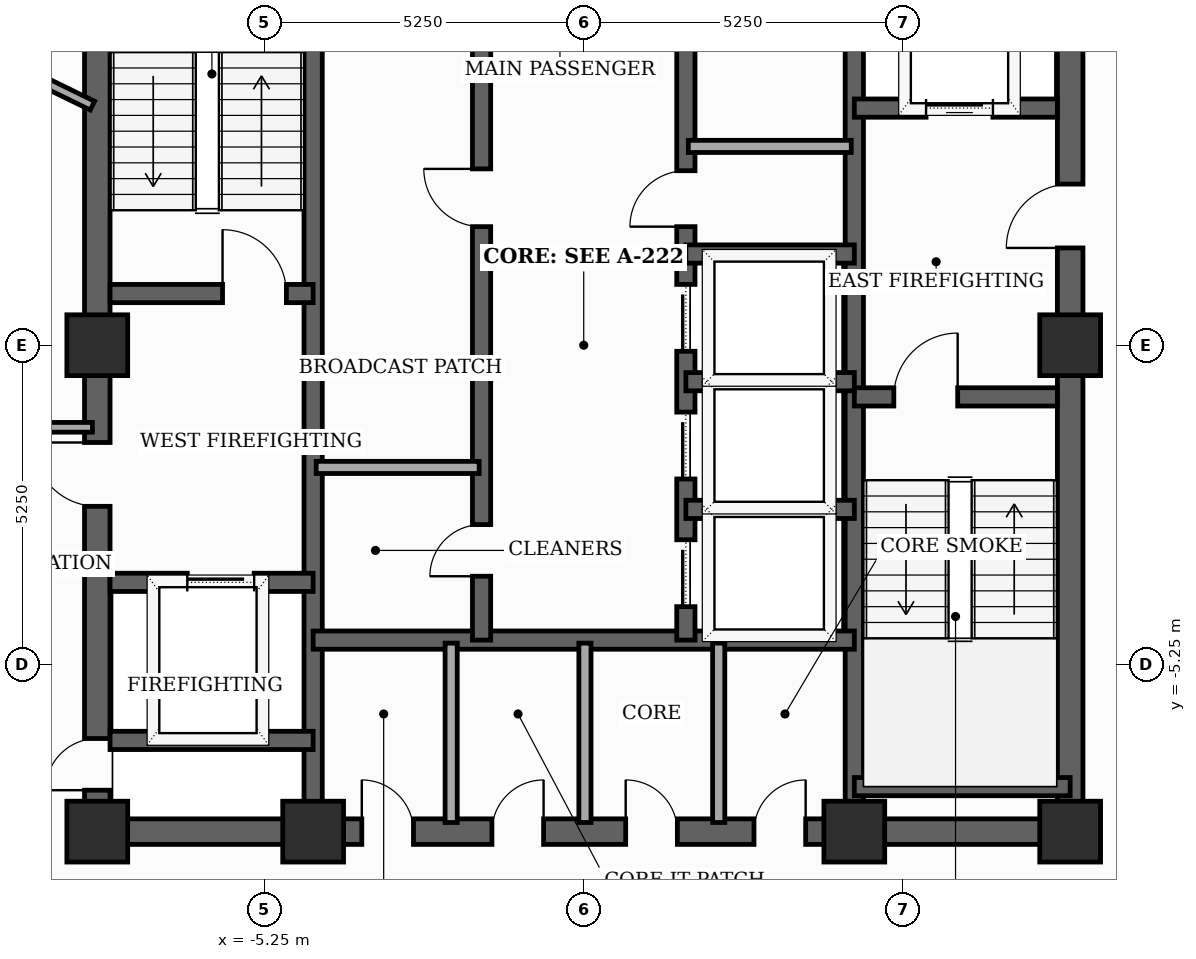
"""IFC4 building model, lengths in metres.
Left out: names, types, materials, properties, quantities, classifications, styles, units other than length and angle.
Written with IfcOpenShell. Run it as: python <this file> out.ifc"""

import sys

from ifc_helpers import new_model, si_unit, direction, frame, frame_2d, origin, origin_2d, place, context, subcontext, project, spatial, rectangle, extrude, element, fill, save


model = new_model("IFC4")
c1 = context("Model", 3, precision=1e-05, world=origin(), true_north=direction((0.0, 1.0)))
c2 = subcontext(c1, "Body", "Model", "MODEL_VIEW")
j1 = project(units=[si_unit("LENGTHUNIT", "METRE"), si_unit("PLANEANGLEUNIT", "RADIAN")], contexts=[c1])
p1 = place(None, origin())
s1 = spatial("IfcSite", under=j1, at=p1, CompositionType="ELEMENT")
p2 = place(p1, origin())
s2 = spatial("IfcBuilding", under=s1, at=p2, CompositionType="ELEMENT")
p3 = place(p2, frame((0.0, 0.0, 305.4)))
s3 = spatial("IfcBuildingStorey", under=s2, at=p3, CompositionType="ELEMENT", Elevation=305.4)
for number, where, z_axis, x_axis in (
    (1, (-8.0, -8.0, 0.0), (0.0, 0.0, 1.0), (1.0, 0.0, 0.0)),
    (2, (-4.45, -8.0, 0.0), (0.0, 0.0, 1.0), (1.0, 0.0, 0.0)),
    (3, (4.45, -8.0, 0.0), (0.0, 0.0, 1.0), (1.0, 0.0, 0.0)),
    (4, (8.0, -8.0, 0.0), (0.0, 0.0, 1.0), (1.0, 0.0, 0.0)),
    (5, (8.0, 0.0, 0.0), (0.0, 0.0, 1.0), (1.0, 0.0, 0.0)),
    (6, (-8.0, 0.0, 0.0), (0.0, 0.0, 1.0), (1.0, 0.0, 0.0)),
):
    element("IfcColumn", number, at=place(p3, frame(where, z_axis=z_axis, x_axis=x_axis)), inside=s3, PredefinedType="COLUMN", context=c2, shape_type="SweptSolid", body=[
        extrude(rectangle(XDim=1.0, YDim=1.0, at=origin_2d()), origin(), (0.0, 0.0, 1.0), 3.7),
    ])
p4 = place(p3, frame((-8.0, -8.0, 0.0), z_axis=(0.0, 0.0, 1.0), x_axis=(0.0, 1.0, 0.0)))
e7 = element("IfcWall", 7, at=p4, inside=s3, PredefinedType="SHEAR", context=c2, shape_type="SweptSolid", body=[
    extrude(rectangle(XDim=16.0, YDim=0.42, at=frame_2d((8.0, 0.0))), origin(), (0.0, 0.0, 1.0), 3.5),
])
p5 = place(p4, frame((0.681, 0.0, 0.0)))
e8 = element("IfcOpeningElement", 8, at=p5, cuts=e7, PredefinedType="OPENING", context=c2, shape_type="SweptSolid", body=[
    extrude(rectangle(XDim=0.85, YDim=2.02, at=frame_2d((0.425, 1.01))), frame((0.0, 0.22, 0.0), z_axis=(0.0, -1.0, 0.0), x_axis=(1.0, 0.0, 0.0)), (0.0, 0.0, 1.0), 0.44),
])
p6 = place(p4, frame((5.35, 0.0, 0.0)))
e9 = element("IfcOpeningElement", 9, at=p6, cuts=e7, PredefinedType="OPENING", context=c2, shape_type="SweptSolid", body=[
    extrude(rectangle(XDim=1.05, YDim=2.15, at=frame_2d((0.525, 1.075))), frame((0.0, 0.22, 0.0), z_axis=(0.0, -1.0, 0.0), x_axis=(1.0, 0.0, 0.0)), (0.0, 0.0, 1.0), 0.44),
])
p7 = place(p3, frame((8.0, -8.0, 0.0), z_axis=(0.0, 0.0, 1.0), x_axis=(0.0, 1.0, 0.0)))
e10 = element("IfcWall", 10, at=p7, inside=s3, PredefinedType="SHEAR", context=c2, shape_type="SweptSolid", body=[
    extrude(rectangle(XDim=16.0, YDim=0.42, at=frame_2d((8.0, 0.0))), origin(), (0.0, 0.0, 1.0), 3.5),
])
p8 = place(p7, frame((9.6, 0.0, 0.0)))
e11 = element("IfcOpeningElement", 11, at=p8, cuts=e10, PredefinedType="OPENING", context=c2, shape_type="SweptSolid", body=[
    extrude(rectangle(XDim=1.05, YDim=2.15, at=frame_2d((0.525, 1.075))), frame((0.0, 0.22, 0.0), z_axis=(0.0, -1.0, 0.0), x_axis=(1.0, 0.0, 0.0)), (0.0, 0.0, 1.0), 0.44),
])
p9 = place(p7, frame((14.469, 0.0, 0.0)))
e12 = element("IfcOpeningElement", 12, at=p9, cuts=e10, PredefinedType="OPENING", context=c2, shape_type="SweptSolid", body=[
    extrude(rectangle(XDim=0.85, YDim=2.02, at=frame_2d((0.425, 1.01))), frame((0.0, 0.22, 0.0), z_axis=(0.0, -1.0, 0.0), x_axis=(1.0, 0.0, 0.0)), (0.0, 0.0, 1.0), 0.44),
])
p10 = place(p3, frame((-8.0, -8.0, 0.0), z_axis=(0.0, 0.0, 1.0), x_axis=(1.0, 0.0, 0.0)))
e13 = element("IfcWall", 13, at=p10, inside=s3, PredefinedType="SHEAR", context=c2, shape_type="SweptSolid", body=[
    extrude(rectangle(XDim=16.0, YDim=0.42, at=frame_2d((8.0, 0.0))), origin(), (0.0, 0.0, 1.0), 3.5),
])
p11 = place(p10, frame((4.35, 0.0, 0.0)))
e14 = element("IfcOpeningElement", 14, at=p11, cuts=e13, PredefinedType="OPENING", context=c2, shape_type="SweptSolid", body=[
    extrude(rectangle(XDim=0.85, YDim=2.02, at=frame_2d((0.425, 1.01))), frame((0.0, 0.22, 0.0), z_axis=(0.0, -1.0, 0.0), x_axis=(1.0, 0.0, 0.0)), (0.0, 0.0, 1.0), 0.44),
])
p12 = place(p10, frame((6.49, 0.0, 0.0)))
e15 = element("IfcOpeningElement", 15, at=p12, cuts=e13, PredefinedType="OPENING", context=c2, shape_type="SweptSolid", body=[
    extrude(rectangle(XDim=0.85, YDim=2.02, at=frame_2d((0.425, 1.01))), frame((0.0, 0.22, 0.0), z_axis=(0.0, -1.0, 0.0), x_axis=(1.0, 0.0, 0.0)), (0.0, 0.0, 1.0), 0.44),
])
p13 = place(p10, frame((8.69, 0.0, 0.0)))
e16 = element("IfcOpeningElement", 16, at=p13, cuts=e13, PredefinedType="OPENING", context=c2, shape_type="SweptSolid", body=[
    extrude(rectangle(XDim=0.85, YDim=2.02, at=frame_2d((0.425, 1.01))), frame((0.0, 0.22, 0.0), z_axis=(0.0, -1.0, 0.0), x_axis=(1.0, 0.0, 0.0)), (0.0, 0.0, 1.0), 0.44),
])
p14 = place(p10, frame((10.8, 0.0, 0.0)))
e17 = element("IfcOpeningElement", 17, at=p14, cuts=e13, PredefinedType="OPENING", context=c2, shape_type="SweptSolid", body=[
    extrude(rectangle(XDim=0.85, YDim=2.02, at=frame_2d((0.425, 1.01))), frame((0.0, 0.22, 0.0), z_axis=(0.0, -1.0, 0.0), x_axis=(1.0, 0.0, 0.0)), (0.0, 0.0, 1.0), 0.44),
])
for number, where, z_axis, x_axis in (
    (18, (-4.45, -7.79, 0.0), (0.0, 0.0, 1.0), (0.0, 1.0, 0.0)),
    (19, (4.45, -7.79, 0.0), (0.0, 0.0, 1.0), (0.0, 1.0, 0.0)),
):
    element("IfcWall", number, at=place(p3, frame(where, z_axis=z_axis, x_axis=x_axis)), inside=s3, PredefinedType="SHEAR", context=c2, shape_type="SweptSolid", body=[
        extrude(rectangle(XDim=15.58, YDim=0.3, at=frame_2d((7.79, 0.0))), origin(), (0.0, 0.0, 1.0), 3.5),
    ])
p15 = place(p3, frame((-7.79, 0.85, 0.0), z_axis=(0.0, 0.0, 1.0), x_axis=(1.0, 0.0, 0.0)))
e20 = element("IfcWall", 20, at=p15, inside=s3, PredefinedType="SHEAR", context=c2, shape_type="SweptSolid", body=[
    extrude(rectangle(XDim=3.34, YDim=0.3, at=frame_2d((1.67, 0.0))), origin(), (0.0, 0.0, 1.0), 3.5),
])
p16 = place(p15, frame((1.85, 0.0, 0.0)))
e21 = element("IfcOpeningElement", 21, at=p16, cuts=e20, PredefinedType="OPENING", context=c2, shape_type="SweptSolid", body=[
    extrude(rectangle(XDim=1.05, YDim=2.15, at=frame_2d((0.525, 1.075))), frame((0.0, 0.16, 0.0), z_axis=(0.0, -1.0, 0.0), x_axis=(1.0, 0.0, 0.0)), (0.0, 0.0, 1.0), 0.32),
])
p17 = place(p3, frame((4.45, -0.85, 0.0), z_axis=(0.0, 0.0, 1.0), x_axis=(1.0, 0.0, 0.0)))
e22 = element("IfcWall", 22, at=p17, inside=s3, PredefinedType="SHEAR", context=c2, shape_type="SweptSolid", body=[
    extrude(rectangle(XDim=3.34, YDim=0.3, at=frame_2d((1.67, 0.0))), origin(), (0.0, 0.0, 1.0), 3.5),
])
p18 = place(p17, frame((0.65, 0.0, 0.0)))
e23 = element("IfcOpeningElement", 23, at=p18, cuts=e22, PredefinedType="OPENING", context=c2, shape_type="SweptSolid", body=[
    extrude(rectangle(XDim=1.05, YDim=2.15, at=frame_2d((0.525, 1.075))), frame((0.0, 0.16, 0.0), z_axis=(0.0, -1.0, 0.0), x_axis=(1.0, 0.0, 0.0)), (0.0, 0.0, 1.0), 0.32),
])
p19 = place(p3, frame((4.45, -7.26, 0.0), z_axis=(0.0, 0.0, 1.0), x_axis=(1.0, 0.0, 0.0)))
e24 = element("IfcWall", 24, at=p19, inside=s3, PredefinedType="SHEAR", context=c2, shape_type="SweptSolid", body=[
    extrude(rectangle(XDim=3.55, YDim=0.3, at=frame_2d((1.775, 0.0))), origin(), (0.0, 0.0, 1.0), 3.5),
])
p20 = place(p3, frame((-7.79, -3.9, 0.0), z_axis=(0.0, 0.0, 1.0), x_axis=(1.0, 0.0, 0.0)))
e25 = element("IfcWall", 25, at=p20, inside=s3, PredefinedType="SHEAR", context=c2, shape_type="SweptSolid", body=[
    extrude(rectangle(XDim=3.34, YDim=0.3, at=frame_2d((1.67, 0.0))), origin(), (0.0, 0.0, 1.0), 3.5),
])
p21 = place(p20, frame((1.27, 0.0, 0.0)))
e26 = element("IfcOpeningElement", 26, at=p21, cuts=e25, PredefinedType="OPENING", context=c2, shape_type="SweptSolid", body=[
    extrude(rectangle(XDim=1.1, YDim=2.1, at=frame_2d((0.55, 1.05))), frame((0.0, 0.16, 0.0), z_axis=(0.0, -1.0, 0.0), x_axis=(1.0, 0.0, 0.0)), (0.0, 0.0, 1.0), 0.32),
])
p22 = place(p3, frame((-7.79, -6.5, 0.0), z_axis=(0.0, 0.0, 1.0), x_axis=(1.0, 0.0, 0.0)))
e27 = element("IfcWall", 27, at=p22, inside=s3, PredefinedType="SHEAR", context=c2, shape_type="SweptSolid", body=[
    extrude(rectangle(XDim=3.34, YDim=0.3, at=frame_2d((1.67, 0.0))), origin(), (0.0, 0.0, 1.0), 3.5),
])
p23 = place(p3, frame((4.45, 3.9, 0.0), z_axis=(0.0, 0.0, 1.0), x_axis=(1.0, 0.0, 0.0)))
e28 = element("IfcWall", 28, at=p23, inside=s3, PredefinedType="SHEAR", context=c2, shape_type="SweptSolid", body=[
    extrude(rectangle(XDim=3.34, YDim=0.3, at=frame_2d((1.67, 0.0))), origin(), (0.0, 0.0, 1.0), 3.5),
])
p24 = place(p23, frame((1.18, 0.0, 0.0)))
e29 = element("IfcOpeningElement", 29, at=p24, cuts=e28, PredefinedType="OPENING", context=c2, shape_type="SweptSolid", body=[
    extrude(rectangle(XDim=1.1, YDim=2.1, at=frame_2d((0.55, 1.05))), frame((0.0, 0.16, 0.0), z_axis=(0.0, -1.0, 0.0), x_axis=(1.0, 0.0, 0.0)), (0.0, 0.0, 1.0), 0.32),
])
p25 = place(p3, frame((-4.45, -4.85, 0.0), z_axis=(0.0, 0.0, 1.0), x_axis=(1.0, 0.0, 0.0)))
e30 = element("IfcWall", 30, at=p25, inside=s3, PredefinedType="SHEAR", context=c2, shape_type="SweptSolid", body=[
    extrude(rectangle(XDim=8.9, YDim=0.3, at=frame_2d((4.45, 0.0))), origin(), (0.0, 0.0, 1.0), 3.5),
])
p26 = place(p3, frame((-1.68, -4.85, 0.0), z_axis=(0.0, 0.0, 1.0), x_axis=(0.0, 1.0, 0.0)))
e31 = element("IfcWall", 31, at=p26, inside=s3, PredefinedType="SHEAR", context=c2, shape_type="SweptSolid", body=[
    extrude(rectangle(XDim=12.64, YDim=0.3, at=frame_2d((6.32, 0.0))), origin(), (0.0, 0.0, 1.0), 3.5),
])
p27 = place(p26, frame((1.05, 0.0, 0.0)))
e32 = element("IfcOpeningElement", 32, at=p27, cuts=e31, PredefinedType="OPENING", context=c2, shape_type="SweptSolid", body=[
    extrude(rectangle(XDim=0.85, YDim=2.02, at=frame_2d((0.425, 1.01))), frame((0.0, 0.16, 0.0), z_axis=(0.0, -1.0, 0.0), x_axis=(1.0, 0.0, 0.0)), (0.0, 0.0, 1.0), 0.32),
])
p28 = place(p26, frame((6.8, 0.0, 0.0)))
e33 = element("IfcOpeningElement", 33, at=p28, cuts=e31, PredefinedType="OPENING", context=c2, shape_type="SweptSolid", body=[
    extrude(rectangle(XDim=0.95, YDim=2.1, at=frame_2d((0.475, 1.05))), frame((0.0, 0.16, 0.0), z_axis=(0.0, -1.0, 0.0), x_axis=(1.0, 0.0, 0.0)), (0.0, 0.0, 1.0), 0.32),
])
p29 = place(p3, frame((1.68, -4.85, 0.0), z_axis=(0.0, 0.0, 1.0), x_axis=(0.0, 1.0, 0.0)))
e34 = element("IfcWall", 34, at=p29, inside=s3, PredefinedType="SHEAR", context=c2, shape_type="SweptSolid", body=[
    extrude(rectangle(XDim=12.64, YDim=0.3, at=frame_2d((6.32, 0.0))), origin(), (0.0, 0.0, 1.0), 3.5),
])
p30 = place(p29, frame((0.55, 0.0, 0.0)))
e35 = element("IfcOpeningElement", 35, at=p30, cuts=e34, PredefinedType="OPENING", context=c2, shape_type="SweptSolid", body=[
    extrude(rectangle(XDim=1.1, YDim=2.1, at=frame_2d((0.55, 1.05))), frame((0.0, 0.16, 0.0), z_axis=(0.0, -1.0, 0.0), x_axis=(1.0, 0.0, 0.0)), (0.0, 0.0, 1.0), 0.32),
])
p31 = place(p29, frame((2.65, 0.0, 0.0)))
e36 = element("IfcOpeningElement", 36, at=p31, cuts=e34, PredefinedType="OPENING", context=c2, shape_type="SweptSolid", body=[
    extrude(rectangle(XDim=1.1, YDim=2.1, at=frame_2d((0.55, 1.05))), frame((0.0, 0.16, 0.0), z_axis=(0.0, -1.0, 0.0), x_axis=(1.0, 0.0, 0.0)), (0.0, 0.0, 1.0), 0.32),
])
p32 = place(p29, frame((4.75, 0.0, 0.0)))
e37 = element("IfcOpeningElement", 37, at=p32, cuts=e34, PredefinedType="OPENING", context=c2, shape_type="SweptSolid", body=[
    extrude(rectangle(XDim=1.1, YDim=2.1, at=frame_2d((0.55, 1.05))), frame((0.0, 0.16, 0.0), z_axis=(0.0, -1.0, 0.0), x_axis=(1.0, 0.0, 0.0)), (0.0, 0.0, 1.0), 0.32),
])
p33 = place(p29, frame((6.8, 0.0, 0.0)))
e38 = element("IfcOpeningElement", 38, at=p33, cuts=e34, PredefinedType="OPENING", context=c2, shape_type="SweptSolid", body=[
    extrude(rectangle(XDim=0.92, YDim=2.1, at=frame_2d((0.46, 1.05))), frame((0.0, 0.16, 0.0), z_axis=(0.0, -1.0, 0.0), x_axis=(1.0, 0.0, 0.0)), (0.0, 0.0, 1.0), 0.32),
])
p34 = place(p29, frame((9.8, 0.0, 0.0)))
e39 = element("IfcOpeningElement", 39, at=p34, cuts=e34, PredefinedType="OPENING", context=c2, shape_type="SweptSolid", body=[
    extrude(rectangle(XDim=0.95, YDim=2.1, at=frame_2d((0.475, 1.05))), frame((0.0, 0.16, 0.0), z_axis=(0.0, -1.0, 0.0), x_axis=(1.0, 0.0, 0.0)), (0.0, 0.0, 1.0), 0.32),
])
for number, where, z_axis, x_axis in (
    (40, (1.68, 1.5, 0.0), (0.0, 0.0, 1.0), (1.0, 0.0, 0.0)),
    (41, (1.68, -2.7, 0.0), (0.0, 0.0, 1.0), (1.0, 0.0, 0.0)),
    (42, (1.68, -0.6, 0.0), (0.0, 0.0, 1.0), (1.0, 0.0, 0.0)),
):
    element("IfcWall", number, at=place(p3, frame(where, z_axis=z_axis, x_axis=x_axis)), inside=s3, PredefinedType="SHEAR", context=c2, shape_type="SweptSolid", body=[
        extrude(rectangle(XDim=2.77, YDim=0.3, at=frame_2d((1.385, 0.0))), origin(), (0.0, 0.0, 1.0), 3.5),
    ])
for number, where, z_axis, x_axis in (
    (43, (-2.18, -7.85, 0.0), (0.0, 0.0, 1.0), (0.0, 1.0, 0.0)),
    (44, (0.02, -7.85, 0.0), (0.0, 0.0, 1.0), (0.0, 1.0, 0.0)),
    (45, (2.22, -7.85, 0.0), (0.0, 0.0, 1.0), (0.0, 1.0, 0.0)),
):
    element("IfcWall", number, at=place(p3, frame(where, z_axis=z_axis, x_axis=x_axis)), inside=s3, PredefinedType="SOLIDWALL", context=c2, shape_type="SweptSolid", body=[
        extrude(rectangle(XDim=2.95, YDim=0.2, at=frame_2d((1.475, 0.0))), origin(), (0.0, 0.0, 1.0), 2.885),
    ])
for number, where, z_axis, x_axis in (
    (46, (-4.4, -2.01, 0.0), (0.0, 0.0, 1.0), (1.0, 0.0, 0.0)),
    (47, (1.72, 3.27, 0.0), (0.0, 0.0, 1.0), (1.0, 0.0, 0.0)),
):
    element("IfcWall", number, at=place(p3, frame(where, z_axis=z_axis, x_axis=x_axis)), inside=s3, PredefinedType="SOLIDWALL", context=c2, shape_type="SweptSolid", body=[
        extrude(rectangle(XDim=2.68, YDim=0.2, at=frame_2d((1.34, 0.0))), origin(), (0.0, 0.0, 1.0), 3.5),
    ])
p35 = place(p3, frame((-8.08, -1.35, 0.0), z_axis=(0.0, 0.0, 1.0), x_axis=(-1.0, 0.0, 0.0)))
e48 = element("IfcWall", 48, at=p35, inside=s3, PredefinedType="PARTITIONING", context=c2, shape_type="SweptSolid", body=[
    extrude(rectangle(XDim=2.57, YDim=0.16, at=frame_2d((1.285, 0.0))), origin(), (0.0, 0.0, 1.0), 2.885),
])
p36 = place(p3, frame((-8.08, 3.941, 0.0), z_axis=(0.0, 0.0, 1.0), x_axis=(-0.898780627628, 0.438398658074, 0.0)))
e49 = element("IfcWall", 49, at=p36, inside=s3, PredefinedType="PARTITIONING", context=c2, shape_type="SweptSolid", body=[
    extrude(rectangle(XDim=6.741, YDim=0.16, at=frame_2d((3.371, 0.0))), origin(), (0.0, 0.0, 1.0), 2.885),
])
p37 = place(p5, origin())
e50 = element("IfcDoor", 50, at=p37, inside=s3, OperationType="SINGLE_SWING_LEFT", PredefinedType="TRAPDOOR", context=c2, shape_type="SweptSolid", body=[
    extrude(rectangle(XDim=0.85, YDim=2.02, at=frame_2d((0.425, 1.01))), frame((0.0, 0.025, 0.0), z_axis=(0.0, -1.0, 0.0), x_axis=(1.0, 0.0, 0.0)), (0.0, 0.0, 1.0), 0.05),
])
fill(e8, e50)
p38 = place(p6, origin())
e51 = element("IfcDoor", 51, at=p38, inside=s3, OperationType="SINGLE_SWING_RIGHT", PredefinedType="DOOR", context=c2, shape_type="SweptSolid", body=[
    extrude(rectangle(XDim=1.05, YDim=2.15, at=frame_2d((0.525, 1.075))), frame((0.0, 0.025, 0.0), z_axis=(0.0, -1.0, 0.0), x_axis=(1.0, 0.0, 0.0)), (0.0, 0.0, 1.0), 0.05),
])
fill(e9, e51)
p39 = place(p8, origin())
e52 = element("IfcDoor", 52, at=p39, inside=s3, OperationType="SINGLE_SWING_LEFT", PredefinedType="DOOR", context=c2, shape_type="SweptSolid", body=[
    extrude(rectangle(XDim=1.05, YDim=2.15, at=frame_2d((0.525, 1.075))), frame((0.0, 0.025, 0.0), z_axis=(0.0, -1.0, 0.0), x_axis=(1.0, 0.0, 0.0)), (0.0, 0.0, 1.0), 0.05),
])
fill(e11, e52)
p40 = place(p11, origin())
e53 = element("IfcDoor", 53, at=p40, inside=s3, OperationType="SINGLE_SWING_LEFT", PredefinedType="TRAPDOOR", context=c2, shape_type="SweptSolid", body=[
    extrude(rectangle(XDim=0.85, YDim=2.02, at=frame_2d((0.425, 1.01))), frame((0.0, 0.025, 0.0), z_axis=(0.0, -1.0, 0.0), x_axis=(1.0, 0.0, 0.0)), (0.0, 0.0, 1.0), 0.05),
])
fill(e14, e53)
p41 = place(p12, origin())
e54 = element("IfcDoor", 54, at=p41, inside=s3, OperationType="SINGLE_SWING_RIGHT", PredefinedType="TRAPDOOR", context=c2, shape_type="SweptSolid", body=[
    extrude(rectangle(XDim=0.85, YDim=2.02, at=frame_2d((0.425, 1.01))), frame((0.0, 0.025, 0.0), z_axis=(0.0, -1.0, 0.0), x_axis=(1.0, 0.0, 0.0)), (0.0, 0.0, 1.0), 0.05),
])
fill(e15, e54)
p42 = place(p13, origin())
e55 = element("IfcDoor", 55, at=p42, inside=s3, OperationType="SINGLE_SWING_LEFT", PredefinedType="TRAPDOOR", context=c2, shape_type="SweptSolid", body=[
    extrude(rectangle(XDim=0.85, YDim=2.02, at=frame_2d((0.425, 1.01))), frame((0.0, 0.025, 0.0), z_axis=(0.0, -1.0, 0.0), x_axis=(1.0, 0.0, 0.0)), (0.0, 0.0, 1.0), 0.05),
])
fill(e16, e55)
p43 = place(p14, origin())
e56 = element("IfcDoor", 56, at=p43, inside=s3, OperationType="SINGLE_SWING_RIGHT", PredefinedType="TRAPDOOR", context=c2, shape_type="SweptSolid", body=[
    extrude(rectangle(XDim=0.85, YDim=2.02, at=frame_2d((0.425, 1.01))), frame((0.0, 0.025, 0.0), z_axis=(0.0, -1.0, 0.0), x_axis=(1.0, 0.0, 0.0)), (0.0, 0.0, 1.0), 0.05),
])
fill(e17, e56)
p44 = place(p16, origin())
e57 = element("IfcDoor", 57, at=p44, inside=s3, OperationType="SINGLE_SWING_LEFT", PredefinedType="DOOR", context=c2, shape_type="SweptSolid", body=[
    extrude(rectangle(XDim=1.05, YDim=2.15, at=frame_2d((0.525, 1.075))), frame((0.0, 0.025, 0.0), z_axis=(0.0, -1.0, 0.0), x_axis=(1.0, 0.0, 0.0)), (0.0, 0.0, 1.0), 0.05),
])
fill(e21, e57)
p45 = place(p18, origin())
e58 = element("IfcDoor", 58, at=p45, inside=s3, OperationType="SINGLE_SWING_RIGHT", PredefinedType="DOOR", context=c2, shape_type="SweptSolid", body=[
    extrude(rectangle(XDim=1.05, YDim=2.15, at=frame_2d((0.525, 1.075))), frame((0.0, 0.025, 0.0), z_axis=(0.0, -1.0, 0.0), x_axis=(1.0, 0.0, 0.0)), (0.0, 0.0, 1.0), 0.05),
])
fill(e23, e58)
p46 = place(p21, origin())
e59 = element("IfcDoor", 59, at=p46, inside=s3, OperationType="SLIDING_TO_LEFT", PredefinedType="DOOR", context=c2, shape_type="SweptSolid", body=[
    extrude(rectangle(XDim=1.1, YDim=2.1, at=frame_2d((0.55, 1.05))), frame((0.0, 0.025, 0.0), z_axis=(0.0, -1.0, 0.0), x_axis=(1.0, 0.0, 0.0)), (0.0, 0.0, 1.0), 0.05),
])
fill(e26, e59)
p47 = place(p24, origin())
e60 = element("IfcDoor", 60, at=p47, inside=s3, OperationType="SLIDING_TO_LEFT", PredefinedType="DOOR", context=c2, shape_type="SweptSolid", body=[
    extrude(rectangle(XDim=1.1, YDim=2.1, at=frame_2d((0.55, 1.05))), frame((0.0, 0.025, 0.0), z_axis=(0.0, -1.0, 0.0), x_axis=(1.0, 0.0, 0.0)), (0.0, 0.0, 1.0), 0.05),
])
fill(e29, e60)
p48 = place(p27, origin())
e61 = element("IfcDoor", 61, at=p48, inside=s3, OperationType="SINGLE_SWING_LEFT", PredefinedType="TRAPDOOR", context=c2, shape_type="SweptSolid", body=[
    extrude(rectangle(XDim=0.85, YDim=2.02, at=frame_2d((0.425, 1.01))), frame((0.0, 0.025, 0.0), z_axis=(0.0, -1.0, 0.0), x_axis=(1.0, 0.0, 0.0)), (0.0, 0.0, 1.0), 0.05),
])
fill(e32, e61)
p49 = place(p28, origin())
e62 = element("IfcDoor", 62, at=p49, inside=s3, OperationType="SINGLE_SWING_RIGHT", PredefinedType="DOOR", context=c2, shape_type="SweptSolid", body=[
    extrude(rectangle(XDim=0.95, YDim=2.1, at=frame_2d((0.475, 1.05))), frame((0.0, 0.025, 0.0), z_axis=(0.0, -1.0, 0.0), x_axis=(1.0, 0.0, 0.0)), (0.0, 0.0, 1.0), 0.05),
])
fill(e33, e62)
p50 = place(p30, origin())
e63 = element("IfcDoor", 63, at=p50, inside=s3, OperationType="SLIDING_TO_LEFT", PredefinedType="DOOR", context=c2, shape_type="SweptSolid", body=[
    extrude(rectangle(XDim=1.1, YDim=2.1, at=frame_2d((0.55, 1.05))), frame((0.0, 0.025, 0.0), z_axis=(0.0, -1.0, 0.0), x_axis=(1.0, 0.0, 0.0)), (0.0, 0.0, 1.0), 0.05),
])
fill(e35, e63)
p51 = place(p31, origin())
e64 = element("IfcDoor", 64, at=p51, inside=s3, OperationType="SLIDING_TO_LEFT", PredefinedType="DOOR", context=c2, shape_type="SweptSolid", body=[
    extrude(rectangle(XDim=1.1, YDim=2.1, at=frame_2d((0.55, 1.05))), frame((0.0, 0.025, 0.0), z_axis=(0.0, -1.0, 0.0), x_axis=(1.0, 0.0, 0.0)), (0.0, 0.0, 1.0), 0.05),
])
fill(e36, e64)
p52 = place(p32, origin())
e65 = element("IfcDoor", 65, at=p52, inside=s3, OperationType="SLIDING_TO_LEFT", PredefinedType="DOOR", context=c2, shape_type="SweptSolid", body=[
    extrude(rectangle(XDim=1.1, YDim=2.1, at=frame_2d((0.55, 1.05))), frame((0.0, 0.025, 0.0), z_axis=(0.0, -1.0, 0.0), x_axis=(1.0, 0.0, 0.0)), (0.0, 0.0, 1.0), 0.05),
])
fill(e37, e65)
p53 = place(p33, origin())
e66 = element("IfcDoor", 66, at=p53, inside=s3, OperationType="SINGLE_SWING_LEFT", PredefinedType="DOOR", context=c2, shape_type="SweptSolid", body=[
    extrude(rectangle(XDim=0.92, YDim=2.1, at=frame_2d((0.46, 1.05))), frame((0.0, 0.025, 0.0), z_axis=(0.0, -1.0, 0.0), x_axis=(1.0, 0.0, 0.0)), (0.0, 0.0, 1.0), 0.05),
])
fill(e38, e66)
save(model, sys.argv[1])
